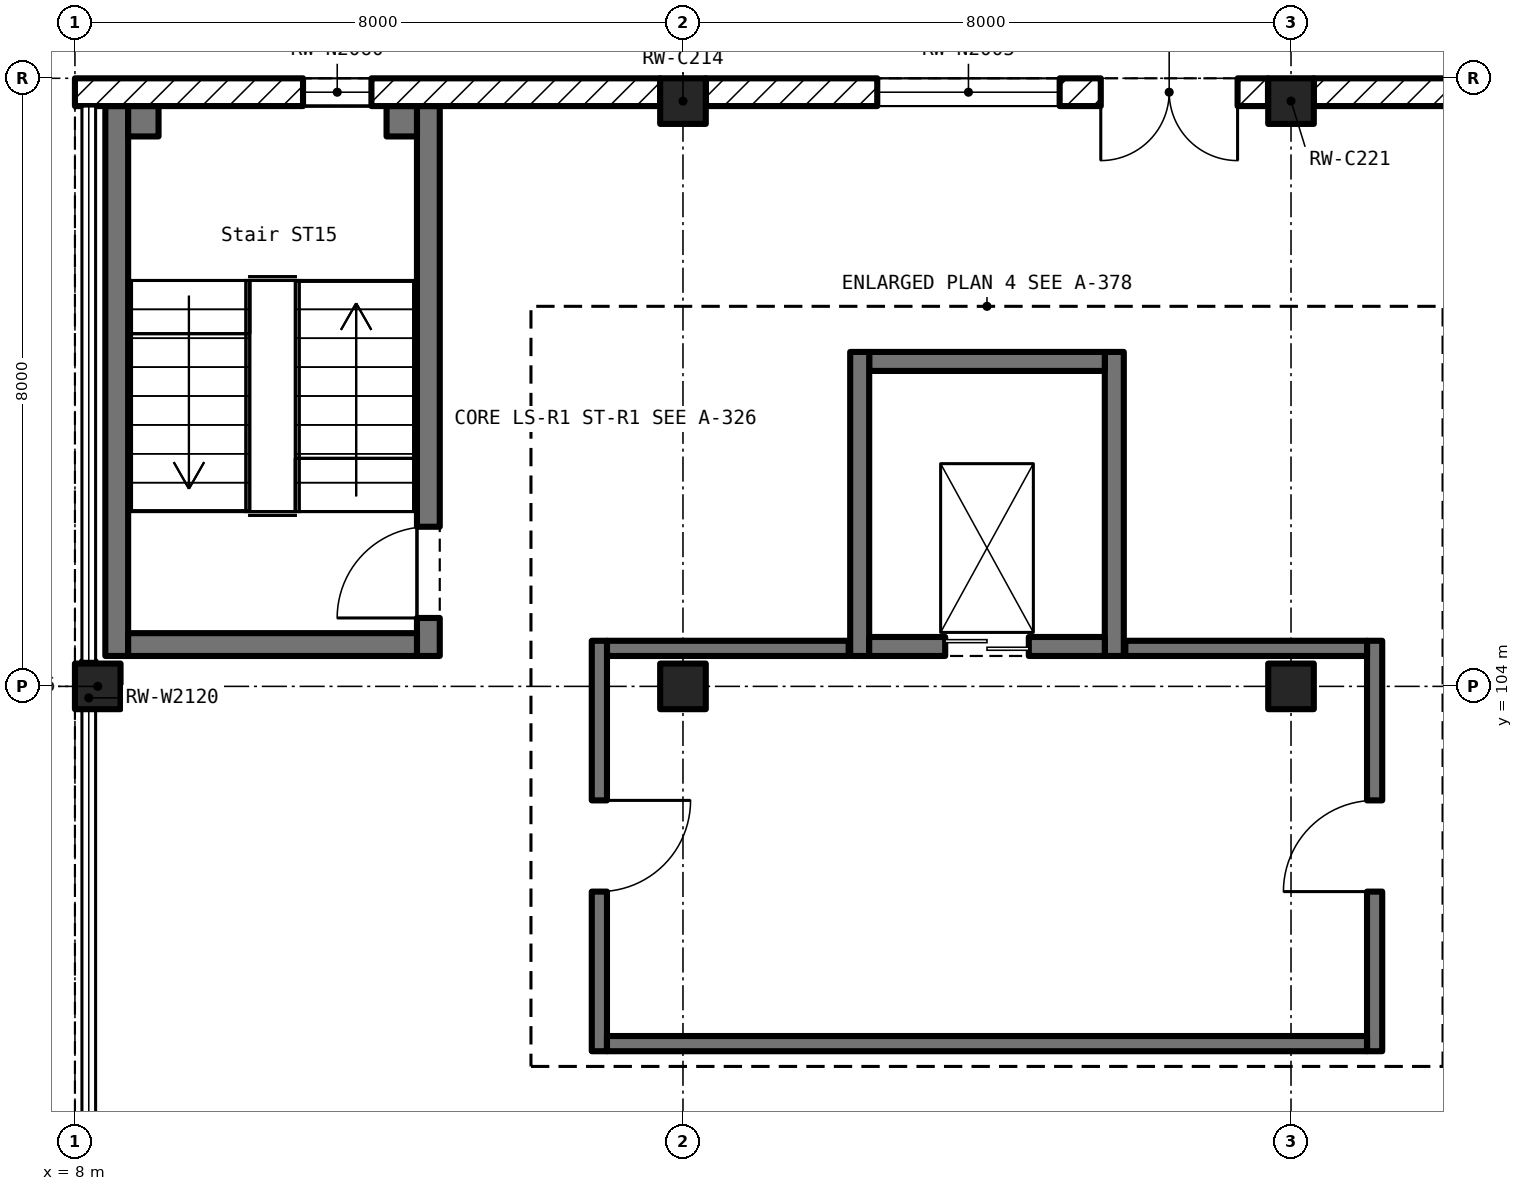
"""IFC4 building model, lengths in metres.
Left out: names, types, materials, properties, quantities, classifications, styles, units other than length and angle.
Written with IfcOpenShell. Run it as: python <this file> out.ifc"""

import sys

from ifc_helpers import new_model, si_unit, direction, frame, frame_2d, origin, origin_2d, place, context, subcontext, project, spatial, rectangle, extrude, element, fill, save


model = new_model("IFC4")
c1 = context("Model", 3, precision=1e-05, world=origin(), true_north=direction((0.0, 1.0)))
c2 = subcontext(c1, "Body", "Model", "MODEL_VIEW")
j1 = project(units=[si_unit("LENGTHUNIT", "METRE"), si_unit("PLANEANGLEUNIT", "RADIAN")], contexts=[c1])
p1 = place(None, origin())
s1 = spatial("IfcSite", under=j1, at=p1, CompositionType="ELEMENT")
p2 = place(p1, origin())
s2 = spatial("IfcBuilding", under=s1, at=p2, CompositionType="ELEMENT")
p3 = place(p2, origin())
s3 = spatial("IfcBuildingStorey", under=s2, at=p3, CompositionType="ELEMENT", Elevation=0.0)
for number, where, z_axis, x_axis in (
    (1, (8.3, 104.0, 0.0), (0.0, 0.0, 1.0), (1.0, 0.0, 0.0)),
    (2, (16.0, 104.0, 0.0), (0.0, 0.0, 1.0), (1.0, 0.0, 0.0)),
    (3, (16.0, 111.7, 0.0), (0.0, 0.0, 1.0), (1.0, 0.0, 0.0)),
    (4, (24.0, 104.0, 0.0), (0.0, 0.0, 1.0), (1.0, 0.0, 0.0)),
    (5, (24.0, 111.7, 0.0), (0.0, 0.0, 1.0), (1.0, 0.0, 0.0)),
):
    element("IfcColumn", number, at=place(p3, frame(where, z_axis=z_axis, x_axis=x_axis)), inside=s3, PredefinedType="COLUMN", context=c2, shape_type="SweptSolid", body=[
        extrude(rectangle(XDim=0.6, YDim=0.6, at=origin_2d()), origin(), (0.0, 0.0, 1.0), 6.0),
    ])
p4 = place(p3, frame((30.817, 111.817, 0.0), z_axis=(0.0, 0.0, 1.0), x_axis=(-1.0, 0.0, 0.0)))
e6 = element("IfcWall", 6, at=p4, inside=s3, PredefinedType="SOLIDWALL", context=c2, shape_type="SweptSolid", body=[
    extrude(rectangle(XDim=6.517, YDim=0.365, at=frame_2d((3.258, 0.0))), origin(), (0.0, 0.0, 1.0), 5.05),
])
p5 = place(p4, frame((2.059, 0.0, 1.0)))
e7 = element("IfcOpeningElement", 7, at=p5, cuts=e6, PredefinedType="OPENING", context=c2, shape_type="SweptSolid", body=[
    extrude(rectangle(XDim=2.4, YDim=2.0, at=frame_2d((1.2, 1.0))), frame((0.0, 0.195, 0.0), z_axis=(0.0, -1.0, 0.0), x_axis=(1.0, 0.0, 0.0)), (0.0, 0.0, 1.0), 0.389),
])
p6 = place(p3, frame((23.697, 111.817, 0.0), z_axis=(0.0, 0.0, 1.0), x_axis=(-1.0, 0.0, 0.0)))
e8 = element("IfcWall", 8, at=p6, inside=s3, PredefinedType="SOLIDWALL", context=c2, shape_type="SweptSolid", body=[
    extrude(rectangle(XDim=7.397, YDim=0.365, at=frame_2d((3.698, 0.0))), origin(), (0.0, 0.0, 1.0), 5.05),
])
p7 = place(p6, frame((2.741, 0.0, 1.0)))
e9 = element("IfcOpeningElement", 9, at=p7, cuts=e8, PredefinedType="OPENING", context=c2, shape_type="SweptSolid", body=[
    extrude(rectangle(XDim=2.4, YDim=2.0, at=frame_2d((1.2, 1.0))), frame((0.0, 0.195, 0.0), z_axis=(0.0, -1.0, 0.0), x_axis=(1.0, 0.0, 0.0)), (0.0, 0.0, 1.0), 0.389),
])
p8 = place(p6, frame((0.4, 0.0, 0.0)))
e10 = element("IfcOpeningElement", 10, at=p8, cuts=e8, PredefinedType="OPENING", context=c2, shape_type="SweptSolid", body=[
    extrude(rectangle(XDim=1.8, YDim=2.4, at=frame_2d((0.9, 1.2))), frame((0.0, 0.195, 0.0), z_axis=(0.0, -1.0, 0.0), x_axis=(1.0, 0.0, 0.0)), (0.0, 0.0, 1.0), 0.389),
])
p9 = place(p3, frame((15.701, 111.817, 0.0), z_axis=(0.0, 0.0, 1.0), x_axis=(-1.0, 0.0, 0.0)))
e11 = element("IfcWall", 11, at=p9, inside=s3, PredefinedType="SOLIDWALL", context=c2, shape_type="SweptSolid", body=[
    extrude(rectangle(XDim=7.701, YDim=0.365, at=frame_2d((3.851, 0.0))), origin(), (0.0, 0.0, 1.0), 5.05),
])
p10 = place(p9, frame((3.8, 0.0, 1.0)))
e12 = element("IfcOpeningElement", 12, at=p10, cuts=e11, PredefinedType="OPENING", context=c2, shape_type="SweptSolid", body=[
    extrude(rectangle(XDim=0.9, YDim=2.0, at=frame_2d((0.45, 1.0))), frame((0.0, 0.195, 0.0), z_axis=(0.0, -1.0, 0.0), x_axis=(1.0, 0.0, 0.0)), (0.0, 0.0, 1.0), 0.389),
])
p11 = place(p3, frame((12.65, 104.4, 0.0), z_axis=(0.0, 0.0, 1.0), x_axis=(0.0, 1.0, 0.0)))
e13 = element("IfcWall", 13, at=p11, inside=s3, PredefinedType="SOLIDWALL", context=c2, shape_type="SweptSolid", body=[
    extrude(rectangle(XDim=7.235, YDim=0.3, at=frame_2d((3.618, 0.0))), origin(), (0.0, 0.0, 1.0), 6.0),
])
p12 = place(p11, frame((0.5, 0.0, 0.0)))
e14 = element("IfcOpeningElement", 14, at=p12, cuts=e13, PredefinedType="OPENING", context=c2, shape_type="SweptSolid", body=[
    extrude(rectangle(XDim=1.2, YDim=2.1, at=frame_2d((0.6, 1.05))), frame((0.0, 0.162, 0.0), z_axis=(0.0, -1.0, 0.0), x_axis=(1.0, 0.0, 0.0)), (0.0, 0.0, 1.0), 0.324),
])
p13 = place(p3, frame((8.55, 111.635, 0.0), z_axis=(0.0, 0.0, 1.0), x_axis=(0.0, -1.0, 0.0)))
e15 = element("IfcWall", 15, at=p13, inside=s3, PredefinedType="SOLIDWALL", context=c2, shape_type="SweptSolid", body=[
    extrude(rectangle(XDim=7.235, YDim=0.3, at=frame_2d((3.618, 0.0))), origin(), (0.0, 0.0, 1.0), 6.0),
])
p14 = place(p3, frame((8.7, 104.55, 0.0), z_axis=(0.0, 0.0, 1.0), x_axis=(1.0, 0.0, 0.0)))
e16 = element("IfcWall", 16, at=p14, inside=s3, PredefinedType="SOLIDWALL", context=c2, shape_type="SweptSolid", body=[
    extrude(rectangle(XDim=3.8, YDim=0.3, at=frame_2d((1.9, 0.0))), origin(), (0.0, 0.0, 1.0), 6.0),
])
p15 = place(p3, frame((12.5, 111.435, 0.0), z_axis=(0.0, 0.0, 1.0), x_axis=(-1.0, 0.0, 0.0)))
e17 = element("IfcWall", 17, at=p15, inside=s3, PredefinedType="SOLIDWALL", context=c2, shape_type="SweptSolid", body=[
    extrude(rectangle(XDim=0.4, YDim=0.4, at=frame_2d((0.2, 0.0))), origin(), (0.0, 0.0, 1.0), 6.0),
])
p16 = place(p3, frame((9.1, 111.435, 0.0), z_axis=(0.0, 0.0, 1.0), x_axis=(-1.0, 0.0, 0.0)))
e18 = element("IfcWall", 18, at=p16, inside=s3, PredefinedType="SOLIDWALL", context=c2, shape_type="SweptSolid", body=[
    extrude(rectangle(XDim=0.4, YDim=0.4, at=frame_2d((0.2, 0.0))), origin(), (0.0, 0.0, 1.0), 6.0),
])
p17 = place(p3, frame((21.675, 104.4, 0.0), z_axis=(0.0, 0.0, 1.0), x_axis=(0.0, 1.0, 0.0)))
e19 = element("IfcWall", 19, at=p17, inside=s3, PredefinedType="SOLIDWALL", context=c2, shape_type="SweptSolid", body=[
    extrude(rectangle(XDim=4.0, YDim=0.25, at=frame_2d((2.0, 0.0))), origin(), (0.0, 0.0, 1.0), 6.0),
])
p18 = place(p3, frame((21.55, 108.275, 0.0), z_axis=(0.0, 0.0, 1.0), x_axis=(-1.0, 0.0, 0.0)))
e20 = element("IfcWall", 20, at=p18, inside=s3, PredefinedType="SOLIDWALL", context=c2, shape_type="SweptSolid", body=[
    extrude(rectangle(XDim=3.1, YDim=0.25, at=frame_2d((1.55, 0.0))), origin(), (0.0, 0.0, 1.0), 6.0),
])
p19 = place(p3, frame((18.325, 108.4, 0.0), z_axis=(0.0, 0.0, 1.0), x_axis=(0.0, -1.0, 0.0)))
e21 = element("IfcWall", 21, at=p19, inside=s3, PredefinedType="SOLIDWALL", context=c2, shape_type="SweptSolid", body=[
    extrude(rectangle(XDim=4.0, YDim=0.25, at=frame_2d((2.0, 0.0))), origin(), (0.0, 0.0, 1.0), 6.0),
])
p20 = place(p3, frame((18.45, 104.525, 0.0), z_axis=(0.0, 0.0, 1.0), x_axis=(1.0, 0.0, 0.0)))
e22 = element("IfcWall", 22, at=p20, inside=s3, PredefinedType="SOLIDWALL", context=c2, shape_type="SweptSolid", body=[
    extrude(rectangle(XDim=3.1, YDim=0.25, at=frame_2d((1.55, 0.0))), origin(), (0.0, 0.0, 1.0), 6.0),
])
p21 = place(p20, frame((1.0, 0.0, 0.0)))
e23 = element("IfcOpeningElement", 23, at=p21, cuts=e22, PredefinedType="OPENING", context=c2, shape_type="SweptSolid", body=[
    extrude(rectangle(XDim=1.1, YDim=2.1, at=frame_2d((0.55, 1.05))), frame((0.0, 0.137, 0.0), z_axis=(0.0, -1.0, 0.0), x_axis=(1.0, 0.0, 0.0)), (0.0, 0.0, 1.0), 0.274),
])
p22 = place(p3, frame((25.1, 99.2, 0.0), z_axis=(0.0, 0.0, 1.0), x_axis=(0.0, 1.0, 0.0)))
e24 = element("IfcWall", 24, at=p22, inside=s3, PredefinedType="PARTITIONING", context=c2, shape_type="SweptSolid", body=[
    extrude(rectangle(XDim=5.4, YDim=0.2, at=frame_2d((2.7, 0.0))), origin(), (0.0, 0.0, 1.0), 5.85),
])
p23 = place(p22, frame((2.1, 0.0, 0.0)))
e25 = element("IfcOpeningElement", 25, at=p23, cuts=e24, PredefinedType="OPENING", context=c2, shape_type="SweptSolid", body=[
    extrude(rectangle(XDim=1.2, YDim=2.1, at=frame_2d((0.6, 1.05))), frame((0.0, 0.112, 0.0), z_axis=(0.0, -1.0, 0.0), x_axis=(1.0, 0.0, 0.0)), (0.0, 0.0, 1.0), 0.224),
])
for number, where, z_axis, x_axis in (
    (26, (25.0, 104.5, 0.0), (0.0, 0.0, 1.0), (-1.0, 0.0, 0.0)),
    (27, (18.18, 104.5, 0.0), (0.0, 0.0, 1.0), (-1.0, 0.0, 0.0)),
):
    element("IfcWall", number, at=place(p3, frame(where, z_axis=z_axis, x_axis=x_axis)), inside=s3, PredefinedType="PARTITIONING", context=c2, shape_type="SweptSolid", body=[
        extrude(rectangle(XDim=3.18, YDim=0.2, at=frame_2d((1.59, 0.0))), origin(), (0.0, 0.0, 1.0), 5.85),
    ])
p24 = place(p3, frame((14.9, 104.6, 0.0), z_axis=(0.0, 0.0, 1.0), x_axis=(0.0, -1.0, 0.0)))
e28 = element("IfcWall", 28, at=p24, inside=s3, PredefinedType="PARTITIONING", context=c2, shape_type="SweptSolid", body=[
    extrude(rectangle(XDim=5.4, YDim=0.2, at=frame_2d((2.7, 0.0))), origin(), (0.0, 0.0, 1.0), 5.85),
])
p25 = place(p24, frame((2.1, 0.0, 0.0)))
e29 = element("IfcOpeningElement", 29, at=p25, cuts=e28, PredefinedType="OPENING", context=c2, shape_type="SweptSolid", body=[
    extrude(rectangle(XDim=1.2, YDim=2.1, at=frame_2d((0.6, 1.05))), frame((0.0, 0.112, 0.0), z_axis=(0.0, -1.0, 0.0), x_axis=(1.0, 0.0, 0.0)), (0.0, 0.0, 1.0), 0.224),
])
p26 = place(p3, frame((15.0, 99.3, 0.0), z_axis=(0.0, 0.0, 1.0), x_axis=(1.0, 0.0, 0.0)))
e30 = element("IfcWall", 30, at=p26, inside=s3, PredefinedType="PARTITIONING", context=c2, shape_type="SweptSolid", body=[
    extrude(rectangle(XDim=10.0, YDim=0.2, at=frame_2d((5.0, 0.0))), origin(), (0.0, 0.0, 1.0), 5.85),
])
p27 = place(p3, frame((8.182, 104.33, 0.0), z_axis=(0.0, 0.0, 1.0), x_axis=(0.0, -1.0, 0.0)))
e31 = element("IfcWall", 31, at=p27, inside=s3, PredefinedType="SOLIDWALL", context=c2, shape_type="SweptSolid", body=[
    extrude(rectangle(XDim=0.305, YDim=0.18, at=frame_2d((0.153, 0.0))), origin(), (0.0, 0.0, 1.0), 4.2),
])
p28 = place(p3, frame((8.182, 103.696, 0.0), z_axis=(0.0, 0.0, 1.0), x_axis=(0.0, 1.0, 0.0)))
e32 = element("IfcWall", 32, at=p28, inside=s3, PredefinedType="SOLIDWALL", context=c2, shape_type="SweptSolid", body=[
    extrude(rectangle(XDim=0.305, YDim=0.18, at=frame_2d((0.152, 0.0))), origin(), (0.0, 0.0, 1.0), 4.2),
])
p29 = place(p7, origin())
e33 = element("IfcWindow", 33, at=p29, inside=s3, PartitioningType="DOUBLE_PANEL_VERTICAL", PredefinedType="WINDOW", context=c2, shape_type="SweptSolid", body=[
    extrude(rectangle(XDim=2.4, YDim=2.0, at=frame_2d((1.2, 1.0))), frame((0.0, 0.03, 0.0), z_axis=(0.0, -1.0, 0.0), x_axis=(1.0, 0.0, 0.0)), (0.0, 0.0, 1.0), 0.06),
])
fill(e9, e33)
p30 = place(p12, origin())
e34 = element("IfcDoor", 34, at=p30, inside=s3, OperationType="SINGLE_SWING_LEFT", PredefinedType="DOOR", context=c2, shape_type="SweptSolid", body=[
    extrude(rectangle(XDim=1.2, YDim=2.1, at=frame_2d((0.6, 1.05))), frame((0.0, 0.025, 0.0), z_axis=(0.0, -1.0, 0.0), x_axis=(1.0, 0.0, 0.0)), (0.0, 0.0, 1.0), 0.05),
])
fill(e14, e34)
p31 = place(p21, origin())
e35 = element("IfcDoor", 35, at=p31, inside=s3, OperationType="DOUBLE_DOOR_SLIDING", PredefinedType="DOOR", context=c2, shape_type="SweptSolid", body=[
    extrude(rectangle(XDim=1.1, YDim=2.1, at=frame_2d((0.55, 1.05))), frame((0.0, 0.025, 0.0), z_axis=(0.0, -1.0, 0.0), x_axis=(1.0, 0.0, 0.0)), (0.0, 0.0, 1.0), 0.05),
])
fill(e23, e35)
p32 = place(p23, origin())
e36 = element("IfcDoor", 36, at=p32, inside=s3, OperationType="SINGLE_SWING_LEFT", PredefinedType="DOOR", context=c2, shape_type="SweptSolid", body=[
    extrude(rectangle(XDim=1.2, YDim=2.1, at=frame_2d((0.6, 1.05))), frame((0.0, 0.025, 0.0), z_axis=(0.0, -1.0, 0.0), x_axis=(1.0, 0.0, 0.0)), (0.0, 0.0, 1.0), 0.05),
])
fill(e25, e36)
p33 = place(p25, origin())
e37 = element("IfcDoor", 37, at=p33, inside=s3, OperationType="SINGLE_SWING_LEFT", PredefinedType="DOOR", context=c2, shape_type="SweptSolid", body=[
    extrude(rectangle(XDim=1.2, YDim=2.1, at=frame_2d((0.6, 1.05))), frame((0.0, 0.025, 0.0), z_axis=(0.0, -1.0, 0.0), x_axis=(1.0, 0.0, 0.0)), (0.0, 0.0, 1.0), 0.05),
])
fill(e29, e37)
p34 = place(p8, origin())
e38 = element("IfcDoor", 38, at=p34, inside=s3, OperationType="DOUBLE_DOOR_DOUBLE_SWING", PredefinedType="DOOR", context=c2, shape_type="SweptSolid", body=[
    extrude(rectangle(XDim=1.8, YDim=2.4, at=frame_2d((0.9, 1.2))), frame((0.0, 0.025, 0.0), z_axis=(0.0, -1.0, 0.0), x_axis=(1.0, 0.0, 0.0)), (0.0, 0.0, 1.0), 0.05),
])
fill(e10, e38)
p35 = place(p10, origin())
e39 = element("IfcWindow", 39, at=p35, inside=s3, PartitioningType="SINGLE_PANEL", PredefinedType="WINDOW", context=c2, shape_type="SweptSolid", body=[
    extrude(rectangle(XDim=0.9, YDim=2.0, at=frame_2d((0.45, 1.0))), frame((0.0, 0.03, 0.0), z_axis=(0.0, -1.0, 0.0), x_axis=(1.0, 0.0, 0.0)), (0.0, 0.0, 1.0), 0.06),
])
fill(e12, e39)
save(model, sys.argv[1])
